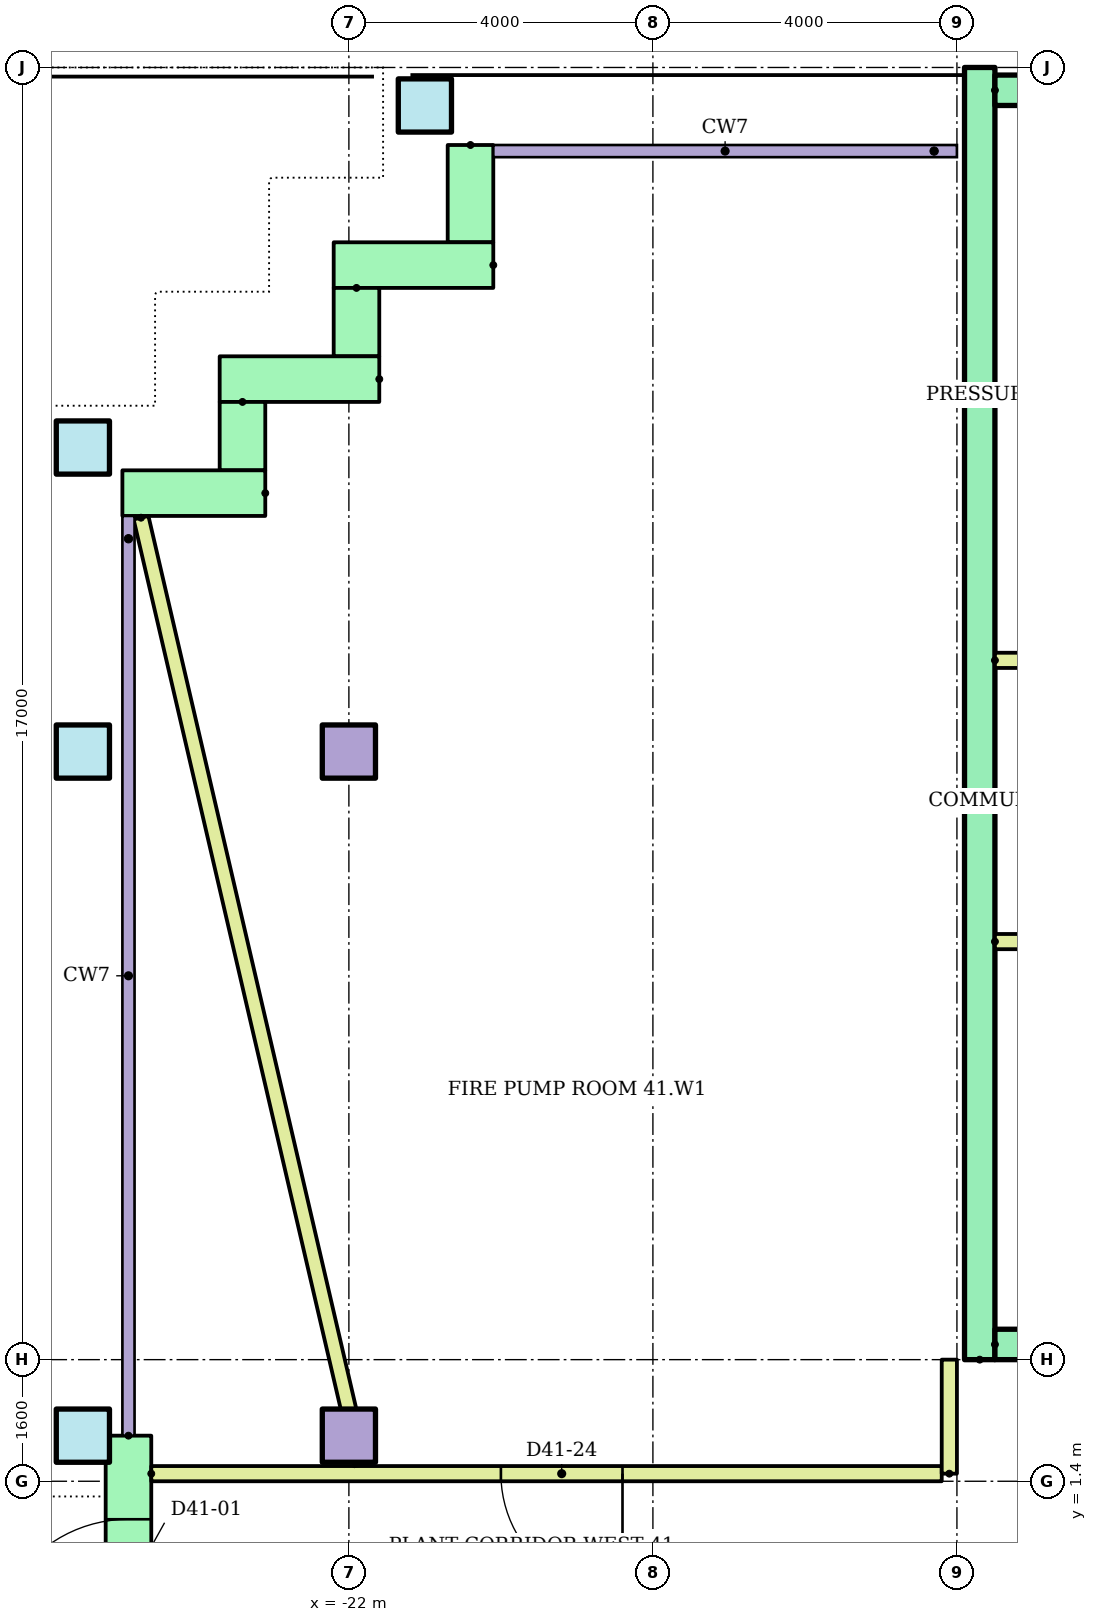
"""IFC4 building model, lengths in metres.
Left out: names, types, materials, properties, quantities, classifications, styles, units other than length and angle.
Written with IfcOpenShell. Run it as: python <this file> out.ifc"""

import sys

from ifc_helpers import new_model, si_unit, direction, frame, frame_2d, origin, origin_2d, place, context, subcontext, project, spatial, rectangle, hollow_rectangle, extrude, element, fill, save


model = new_model("IFC4")
c1 = context("Model", 3, precision=1e-05, world=origin(), true_north=direction((0.0, 1.0)))
c2 = subcontext(c1, "Body", "Model", "MODEL_VIEW")
j1 = project(units=[si_unit("LENGTHUNIT", "METRE"), si_unit("PLANEANGLEUNIT", "RADIAN")], contexts=[c1])
p1 = place(None, origin())
s1 = spatial("IfcSite", under=j1, at=p1, CompositionType="ELEMENT")
p2 = place(p1, origin())
s2 = spatial("IfcBuilding", under=s1, at=p2, CompositionType="ELEMENT")
p3 = place(p2, frame((0.0, 0.0, 161.4)))
s3 = spatial("IfcBuildingStorey", under=s2, at=p3, CompositionType="ELEMENT", Elevation=161.4)
p4 = place(p3, frame((-25.5, 2.0, 0.0)))
e1 = element("IfcColumn", 1, at=p4, inside=s3, PredefinedType="COLUMN", context=c2, shape_type="SweptSolid", body=[
    extrude(hollow_rectangle(XDim=0.7, YDim=0.7, WallThickness=0.036, at=origin_2d()), origin(), (0.0, 0.0, 1.0), 3.9),
])
p5 = place(p3, frame((-22.0, 2.0, 0.0)))
e2 = element("IfcColumn", 2, at=p5, inside=s3, PredefinedType="COLUMN", context=c2, shape_type="SweptSolid", body=[
    extrude(rectangle(XDim=0.7, YDim=0.7, at=origin_2d()), origin(), (0.0, 0.0, 1.0), 3.9),
])
p6 = place(p3, frame((-25.5, 11.0, 0.0)))
e3 = element("IfcColumn", 3, at=p6, inside=s3, PredefinedType="COLUMN", context=c2, shape_type="SweptSolid", body=[
    extrude(hollow_rectangle(XDim=0.7, YDim=0.7, WallThickness=0.036, at=origin_2d()), origin(), (0.0, 0.0, 1.0), 3.9),
])
p7 = place(p3, frame((-22.0, 11.0, 0.0)))
e4 = element("IfcColumn", 4, at=p7, inside=s3, PredefinedType="COLUMN", context=c2, shape_type="SweptSolid", body=[
    extrude(rectangle(XDim=0.7, YDim=0.7, at=origin_2d()), origin(), (0.0, 0.0, 1.0), 3.9),
])
for number, where in (
    (5, (-25.5, 15.0, 0.0)),
    (6, (-21.0, 19.5, 0.0)),
):
    element("IfcColumn", number, at=place(p3, frame(where)), inside=s3, PredefinedType="COLUMN", context=c2, shape_type="SweptSolid", body=[
        extrude(hollow_rectangle(XDim=0.7, YDim=0.7, WallThickness=0.036, at=origin_2d()), origin(), (0.0, 0.0, 1.0), 3.9),
    ])
p8 = place(p3, frame((-20.4, 18.98, 0.0), z_axis=(0.0, 0.0, 1.0), x_axis=(0.0, -1.0, 0.0)))
e7 = element("IfcWall", 7, at=p8, inside=s3, PredefinedType="STANDARD", context=c2, shape_type="SweptSolid", body=[
    extrude(rectangle(XDim=1.28, YDim=0.6, at=frame_2d((0.64, 0.0))), origin(), (0.0, 0.0, 1.0), 3.62),
])
p9 = place(p3, frame((-20.1, 17.4, 0.0), z_axis=(0.0, 0.0, 1.0), x_axis=(-1.0, 0.0, 0.0)))
e8 = element("IfcWall", 8, at=p9, inside=s3, PredefinedType="STANDARD", context=c2, shape_type="SweptSolid", body=[
    extrude(rectangle(XDim=2.1, YDim=0.6, at=frame_2d((1.05, 0.0))), origin(), (0.0, 0.0, 1.0), 3.62),
])
p10 = place(p3, frame((-21.9, 17.1, 0.0), z_axis=(0.0, 0.0, 1.0), x_axis=(0.0, -1.0, 0.0)))
e9 = element("IfcWall", 9, at=p10, inside=s3, PredefinedType="STANDARD", context=c2, shape_type="SweptSolid", body=[
    extrude(rectangle(XDim=0.9, YDim=0.6, at=frame_2d((0.45, 0.0))), origin(), (0.0, 0.0, 1.0), 3.62),
])
p11 = place(p3, frame((-21.6, 15.9, 0.0), z_axis=(0.0, 0.0, 1.0), x_axis=(-1.0, 0.0, 0.0)))
e10 = element("IfcWall", 10, at=p11, inside=s3, PredefinedType="STANDARD", context=c2, shape_type="SweptSolid", body=[
    extrude(rectangle(XDim=2.1, YDim=0.6, at=frame_2d((1.05, 0.0))), origin(), (0.0, 0.0, 1.0), 3.62),
])
p12 = place(p3, frame((-23.4, 15.6, 0.0), z_axis=(0.0, 0.0, 1.0), x_axis=(0.0, -1.0, 0.0)))
e11 = element("IfcWall", 11, at=p12, inside=s3, PredefinedType="STANDARD", context=c2, shape_type="SweptSolid", body=[
    extrude(rectangle(XDim=0.9, YDim=0.6, at=frame_2d((0.45, 0.0))), origin(), (0.0, 0.0, 1.0), 3.62),
])
p13 = place(p3, frame((-23.1, 14.4, 0.0), z_axis=(0.0, 0.0, 1.0), x_axis=(-1.0, 0.0, 0.0)))
e12 = element("IfcWall", 12, at=p13, inside=s3, PredefinedType="STANDARD", context=c2, shape_type="SweptSolid", body=[
    extrude(rectangle(XDim=1.88, YDim=0.6, at=frame_2d((0.94, 0.0))), origin(), (0.0, 0.0, 1.0), 3.62),
])
p14 = place(p3, frame((-24.9, 2.0, 0.0), z_axis=(0.0, 0.0, 1.0), x_axis=(0.0, -1.0, 0.0)))
e13 = element("IfcWall", 13, at=p14, inside=s3, PredefinedType="STANDARD", context=c2, shape_type="SweptSolid", body=[
    extrude(rectangle(XDim=4.0, YDim=0.6, at=frame_2d((2.0, 0.0))), origin(), (0.0, 0.0, 1.0), 3.62),
])
p15 = place(p14, frame((1.1, 0.0, 0.0)))
e14 = element("IfcOpeningElement", 14, at=p15, cuts=e13, PredefinedType="OPENING", context=c2, shape_type="SweptSolid", body=[
    extrude(rectangle(XDim=1.8, YDim=2.1, at=frame_2d((0.9, 1.05))), frame((0.0, 0.31, 0.0), z_axis=(0.0, -1.0, 0.0), x_axis=(1.0, 0.0, 0.0)), (0.0, 0.0, 1.0), 0.62),
])
p16 = place(p3, frame((-13.7, 3.0, 0.0), z_axis=(0.0, 0.0, 1.0), x_axis=(0.0, 1.0, 0.0)))
e15 = element("IfcWall", 15, at=p16, inside=s3, PredefinedType="SHEAR", context=c2, shape_type="SweptSolid", body=[
    extrude(rectangle(XDim=17.0, YDim=0.4, at=frame_2d((8.5, 0.0))), origin(), (0.0, 0.0, 1.0), 3.62),
])
p17 = place(p3, frame((-13.5, 19.7, 0.0)))
e16 = element("IfcWall", 16, at=p17, inside=s3, PredefinedType="SHEAR", context=c2, shape_type="SweptSolid", body=[
    extrude(rectangle(XDim=27.0, YDim=0.4, at=frame_2d((13.5, 0.0))), origin(), (0.0, 0.0, 1.0), 3.62),
])
p18 = place(p3, frame((-13.5, 3.2, 0.0)))
e17 = element("IfcWall", 17, at=p18, inside=s3, PredefinedType="SHEAR", context=c2, shape_type="SweptSolid", body=[
    extrude(rectangle(XDim=27.0, YDim=0.4, at=frame_2d((13.5, 0.0))), origin(), (0.0, 0.0, 1.0), 3.62),
])
p19 = place(p18, frame((22.083, 0.0, 0.0)))
e18 = element("IfcOpeningElement", 18, at=p19, cuts=e17, PredefinedType="OPENING", context=c2, shape_type="SweptSolid", body=[
    extrude(rectangle(XDim=1.1, YDim=2.1, at=frame_2d((0.55, 1.05))), frame((0.0, 0.21, 0.0), z_axis=(0.0, -1.0, 0.0), x_axis=(1.0, 0.0, 0.0)), (0.0, 0.0, 1.0), 0.42),
])
p20 = place(p18, frame((25.128, 0.0, 0.0)))
e19 = element("IfcOpeningElement", 19, at=p20, cuts=e17, PredefinedType="OPENING", context=c2, shape_type="SweptSolid", body=[
    extrude(rectangle(XDim=1.1, YDim=2.1, at=frame_2d((0.55, 1.05))), frame((0.0, 0.21, 0.0), z_axis=(0.0, -1.0, 0.0), x_axis=(1.0, 0.0, 0.0)), (0.0, 0.0, 1.0), 0.42),
])
p21 = place(p18, frame((12.6, 0.0, 0.0)))
e20 = element("IfcOpeningElement", 20, at=p21, cuts=e17, PredefinedType="OPENING", context=c2, shape_type="SweptSolid", body=[
    extrude(rectangle(XDim=1.8, YDim=2.1, at=frame_2d((0.9, 1.05))), frame((0.0, 0.21, 0.0), z_axis=(0.0, -1.0, 0.0), x_axis=(1.0, 0.0, 0.0)), (0.0, 0.0, 1.0), 0.42),
])
for number, where in (
    (21, (-13.5, 8.5, 0.0)),
    (22, (-13.5, 12.2, 0.0)),
):
    element("IfcWall", number, at=place(p3, frame(where)), inside=s3, PredefinedType="PARTITIONING", context=c2, shape_type="SweptSolid", body=[
        extrude(rectangle(XDim=3.9, YDim=0.2, at=frame_2d((1.95, 0.0))), origin(), (0.0, 0.0, 1.0), 3.62),
    ])
p22 = place(p3, frame((-24.6, 1.5, 0.0)))
e23 = element("IfcWall", 23, at=p22, inside=s3, PredefinedType="PARTITIONING", context=c2, shape_type="SweptSolid", body=[
    extrude(rectangle(XDim=10.4, YDim=0.2, at=frame_2d((5.2, 0.0))), origin(), (0.0, 0.0, 1.0), 3.62),
])
p23 = place(p22, frame((4.6, 0.0, 0.0)))
e24 = element("IfcOpeningElement", 24, at=p23, cuts=e23, PredefinedType="OPENING", context=c2, shape_type="SweptSolid", body=[
    extrude(rectangle(XDim=1.6, YDim=2.4, at=frame_2d((0.8, 1.2))), frame((0.0, 0.11, 0.0), z_axis=(0.0, -1.0, 0.0), x_axis=(1.0, 0.0, 0.0)), (0.0, 0.0, 1.0), 0.22),
])
p24 = place(p3, frame((-14.1, 1.5, 0.0), z_axis=(0.0, 0.0, 1.0), x_axis=(0.0, 1.0, 0.0)))
e25 = element("IfcWall", 25, at=p24, inside=s3, PredefinedType="PARTITIONING", context=c2, shape_type="SweptSolid", body=[
    extrude(rectangle(XDim=1.5, YDim=0.2, at=frame_2d((0.75, 0.0))), origin(), (0.0, 0.0, 1.0), 3.62),
])
p25 = place(p3, frame((-24.735, 14.077, 0.0), z_axis=(0.0, 0.0, 1.0), x_axis=(0.226761950661, -0.973950213169, 0.0)))
e26 = element("IfcWall", 26, at=p25, inside=s3, PredefinedType="PARTITIONING", context=c2, shape_type="SweptSolid", body=[
    extrude(rectangle(XDim=12.791, YDim=0.2, at=frame_2d((6.395, 0.0))), origin(), (0.0, 0.0, 1.0), 3.62),
])
p26 = place(p15, frame((1.8, 0.0, 0.0), z_axis=(0.0, 0.0, 1.0), x_axis=(-1.0, 0.0, 0.0)))
e27 = element("IfcDoor", 27, at=p26, inside=s3, OperationType="DOUBLE_DOOR_SINGLE_SWING", PredefinedType="DOOR", context=c2, shape_type="SweptSolid", body=[
    extrude(rectangle(XDim=1.8, YDim=2.1, at=frame_2d((0.9, 1.05))), frame((0.0, 0.025, 0.0), z_axis=(0.0, -1.0, 0.0), x_axis=(1.0, 0.0, 0.0)), (0.0, 0.0, 1.0), 0.05),
])
fill(e14, e27)
p27 = place(p23, frame((1.6, 0.0, 0.0), z_axis=(0.0, 0.0, 1.0), x_axis=(-1.0, 0.0, 0.0)))
e28 = element("IfcDoor", 28, at=p27, inside=s3, OperationType="DOUBLE_DOOR_SINGLE_SWING", PredefinedType="DOOR", context=c2, shape_type="SweptSolid", body=[
    extrude(rectangle(XDim=1.6, YDim=2.4, at=frame_2d((0.8, 1.2))), frame((0.0, 0.025, 0.0), z_axis=(0.0, -1.0, 0.0), x_axis=(1.0, 0.0, 0.0)), (0.0, 0.0, 1.0), 0.05),
])
fill(e24, e28)
save(model, sys.argv[1])
